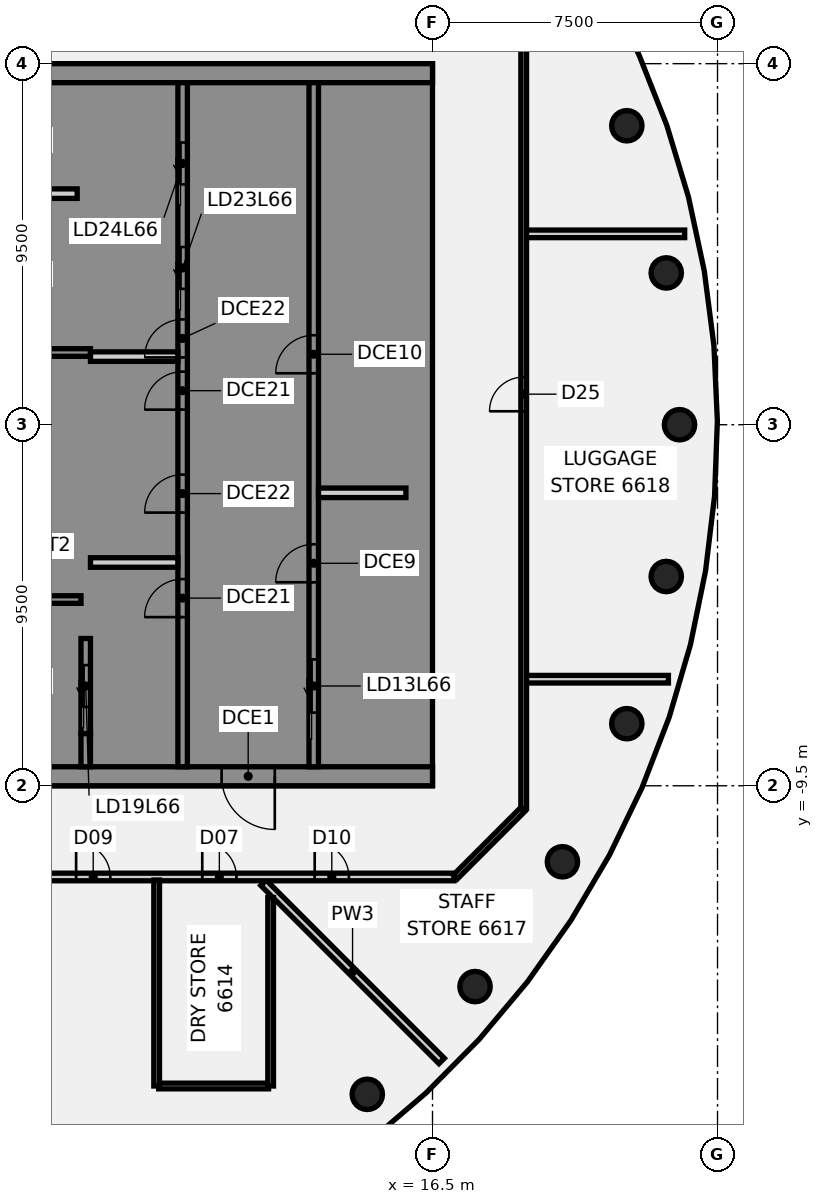
"""IFC4 building model, lengths in metres.
Left out: names, types, materials, properties, quantities, classifications, styles, units other than length and angle.
Written with IfcOpenShell. Run it as: python <this file> out.ifc"""

import sys

from ifc_helpers import new_model, si_unit, direction, frame, frame_2d, origin, origin_2d, place, context, subcontext, project, spatial, polyline, rectangle, circle, outline, extrude, element, fill, save


model = new_model("IFC4")
c1 = context("Model", 3, precision=1e-05, world=origin(), true_north=direction((0.0, 1.0)))
c2 = subcontext(c1, "Body", "Model", "MODEL_VIEW")
j1 = project(units=[si_unit("LENGTHUNIT", "METRE"), si_unit("PLANEANGLEUNIT", "RADIAN")], contexts=[c1])
p1 = place(None, origin())
s1 = spatial("IfcSite", under=j1, at=p1, CompositionType="ELEMENT")
p2 = place(p1, origin())
s2 = spatial("IfcBuilding", under=s1, at=p2, CompositionType="ELEMENT")
p3 = place(p2, frame((0.0, 0.0, 260.4)))
s3 = spatial("IfcBuildingStorey", under=s2, at=p3, CompositionType="ELEMENT", Elevation=260.4)
for number, where, z_axis, x_axis in (
    (1, (23.0, 0.0, -0.14), (0.0, 0.0, 1.0), (1.0, 0.0, 0.0)),
    (2, (22.651, 3.994, -0.14), (0.0, 0.0, 1.0), (1.0, 0.0, 0.0)),
    (3, (21.613, 7.866, -0.14), (0.0, 0.0, 1.0), (1.0, 0.0, 0.0)),
    (4, (14.784, -17.619, -0.14), (0.0, 0.0, 1.0), (1.0, 0.0, 0.0)),
    (5, (17.619, -14.784, -0.14), (0.0, 0.0, 1.0), (1.0, 0.0, 0.0)),
    (6, (19.919, -11.5, -0.14), (0.0, 0.0, 1.0), (1.0, 0.0, 0.0)),
    (7, (21.613, -7.866, -0.14), (0.0, 0.0, 1.0), (1.0, 0.0, 0.0)),
    (8, (22.651, -3.994, -0.14), (0.0, 0.0, 1.0), (1.0, 0.0, 0.0)),
):
    element("IfcColumn", number, at=place(p3, frame(where, z_axis=z_axis, x_axis=x_axis)), inside=s3, PredefinedType="COLUMN", context=c2, shape_type="SweptSolid", body=[
        extrude(circle(Radius=0.4, at=origin_2d()), origin(), (0.0, 0.0, 1.0), 3.6),
    ])
p4 = place(p3, frame((12.052, -12.052, 0.0), z_axis=(0.0, 0.0, 1.0), x_axis=(0.707106781187, -0.707106781187, 0.0)))
e9 = element("IfcWall", 9, at=p4, inside=s3, PredefinedType="PARTITIONING", context=c2, shape_type="SweptSolid", body=[
    extrude(rectangle(XDim=6.631, YDim=0.2, at=frame_2d((3.315, 0.0))), origin(), (0.0, 0.0, 1.0), 2.864),
])
p5 = place(p3, frame((-17.1, -11.9, 0.0), z_axis=(0.0, 0.0, 1.0), x_axis=(1.0, 0.0, 0.0)))
e10 = element("IfcWall", 10, at=p5, inside=s3, PredefinedType="PARTITIONING", context=c2, shape_type="SweptSolid", body=[
    extrude(rectangle(XDim=34.165, YDim=0.2, at=frame_2d((17.083, 0.0))), origin(), (0.0, 0.0, 1.0), 2.864),
])
p6 = place(p5, frame((7.75, 0.0, 0.0)))
e11 = element("IfcOpeningElement", 11, at=p6, cuts=e10, PredefinedType="OPENING", context=c2, shape_type="SweptSolid", body=[
    extrude(rectangle(XDim=0.9, YDim=2.1, at=frame_2d((0.45, 1.05))), frame((0.0, 0.11, 0.0), z_axis=(0.0, -1.0, 0.0), x_axis=(1.0, 0.0, 0.0)), (0.0, 0.0, 1.0), 0.22),
])
p7 = place(p5, frame((27.541, 0.0, 0.0)))
e12 = element("IfcOpeningElement", 12, at=p7, cuts=e10, PredefinedType="OPENING", context=c2, shape_type="SweptSolid", body=[
    extrude(rectangle(XDim=0.9, YDim=2.1, at=frame_2d((0.45, 1.05))), frame((0.0, 0.11, 0.0), z_axis=(0.0, -1.0, 0.0), x_axis=(1.0, 0.0, 0.0)), (0.0, 0.0, 1.0), 0.22),
])
p8 = place(p5, frame((16.809, 0.0, 0.0)))
e13 = element("IfcOpeningElement", 13, at=p8, cuts=e10, PredefinedType="OPENING", context=c2, shape_type="SweptSolid", body=[
    extrude(rectangle(XDim=1.8, YDim=2.1, at=frame_2d((0.9, 1.05))), frame((0.0, 0.11, 0.0), z_axis=(0.0, -1.0, 0.0), x_axis=(1.0, 0.0, 0.0)), (0.0, 0.0, 1.0), 0.22),
])
p9 = place(p5, frame((24.222, 0.0, 0.0)))
e14 = element("IfcOpeningElement", 14, at=p9, cuts=e10, PredefinedType="OPENING", context=c2, shape_type="SweptSolid", body=[
    extrude(rectangle(XDim=0.9, YDim=2.1, at=frame_2d((0.45, 1.05))), frame((0.0, 0.11, 0.0), z_axis=(0.0, -1.0, 0.0), x_axis=(1.0, 0.0, 0.0)), (0.0, 0.0, 1.0), 0.22),
])
p10 = place(p5, frame((30.5, 0.0, 0.0)))
e15 = element("IfcOpeningElement", 15, at=p10, cuts=e10, PredefinedType="OPENING", context=c2, shape_type="SweptSolid", body=[
    extrude(rectangle(XDim=0.9, YDim=2.1, at=frame_2d((0.45, 1.05))), frame((0.0, 0.11, 0.0), z_axis=(0.0, -1.0, 0.0), x_axis=(1.0, 0.0, 0.0)), (0.0, 0.0, 1.0), 0.22),
])
p11 = place(p3, frame((9.296, -17.4, 0.0), z_axis=(0.0, 0.0, 1.0), x_axis=(1.0, 0.0, 0.0)))
e16 = element("IfcWall", 16, at=p11, inside=s3, PredefinedType="PARTITIONING", context=c2, shape_type="SweptSolid", body=[
    extrude(rectangle(XDim=2.89, YDim=0.15, at=frame_2d((1.445, 0.0))), origin(), (0.0, 0.0, 1.0), 2.864),
])
p12 = place(p3, frame((18.955, -6.696, 0.0), z_axis=(0.0, 0.0, 1.0), x_axis=(1.0, 0.0, 0.0)))
e17 = element("IfcWall", 17, at=p12, inside=s3, PredefinedType="PARTITIONING", context=c2, shape_type="SweptSolid", body=[
    extrude(rectangle(XDim=3.753, YDim=0.2, at=frame_2d((1.876, 0.0))), origin(), (0.0, 0.0, 1.0), 2.864),
])
p13 = place(p3, frame((18.955, 5.022, 0.0), z_axis=(0.0, 0.0, 1.0), x_axis=(1.0, 0.0, 0.0)))
e18 = element("IfcWall", 18, at=p13, inside=s3, PredefinedType="PARTITIONING", context=c2, shape_type="SweptSolid", body=[
    extrude(rectangle(XDim=4.181, YDim=0.2, at=frame_2d((2.09, 0.0))), origin(), (0.0, 0.0, 1.0), 2.864),
])
p14 = place(p3, frame((17.1, -11.9, 0.0), z_axis=(0.0, 0.0, 1.0), x_axis=(0.707106781187, 0.707106781187, 0.0)))
e19 = element("IfcWall", 19, at=p14, inside=s3, PredefinedType="PARTITIONING", context=c2, shape_type="SweptSolid", body=[
    extrude(rectangle(XDim=2.505, YDim=0.15, at=frame_2d((1.253, 0.0))), origin(), (0.0, 0.0, 1.0), 2.864),
])
p15 = place(p3, frame((9.241, -17.4, 0.0), z_axis=(0.0, 0.0, 1.0), x_axis=(0.0, 1.0, 0.0)))
e20 = element("IfcWall", 20, at=p15, inside=s3, PredefinedType="PARTITIONING", context=c2, shape_type="SweptSolid", body=[
    extrude(rectangle(XDim=5.42, YDim=0.15, at=frame_2d((2.71, 0.0))), origin(), (0.0, 0.0, 1.0), 2.864),
])
p16 = place(p3, frame((12.241, -17.4, 0.0), z_axis=(0.0, 0.0, 1.0), x_axis=(0.0, 1.0, 0.0)))
e21 = element("IfcWall", 21, at=p16, inside=s3, PredefinedType="PARTITIONING", context=c2, shape_type="SweptSolid", body=[
    extrude(rectangle(XDim=4.959, YDim=0.15, at=frame_2d((2.479, 0.0))), origin(), (0.0, 0.0, 1.0), 2.864),
])
p17 = place(p3, frame((18.9, -10.1, 0.0), z_axis=(0.0, 0.0, 1.0), x_axis=(0.0, 1.0, 0.0)))
e22 = element("IfcWall", 22, at=p17, inside=s3, PredefinedType="PARTITIONING", context=c2, shape_type="SweptSolid", body=[
    extrude(rectangle(XDim=20.2, YDim=0.15, at=frame_2d((10.1, 0.0))), origin(), (0.0, 0.0, 1.0), 2.864),
])
p18 = place(p17, frame((10.454, 0.0, 0.0)))
e23 = element("IfcOpeningElement", 23, at=p18, cuts=e22, PredefinedType="OPENING", context=c2, shape_type="SweptSolid", body=[
    extrude(rectangle(XDim=0.9, YDim=2.1, at=frame_2d((0.45, 1.05))), frame((0.0, 0.085, 0.0), z_axis=(0.0, -1.0, 0.0), x_axis=(1.0, 0.0, 0.0)), (0.0, 0.0, 1.0), 0.17),
])
p19 = place(p3, frame((16.5, -9.25, 0.0), z_axis=(0.0, 0.0, 1.0), x_axis=(-1.0, 0.0, 0.0)))
e24 = element("IfcWall", 24, at=p19, inside=s3, PredefinedType="SHEAR", context=c2, shape_type="SweptSolid", body=[
    extrude(rectangle(XDim=13.0, YDim=0.5, at=frame_2d((6.5, 0.0))), origin(), (0.0, 0.0, 1.0), 3.46),
])
p20 = place(p19, frame((4.15, 0.0, 0.0)))
e25 = element("IfcOpeningElement", 25, at=p20, cuts=e24, PredefinedType="OPENING", context=c2, shape_type="SweptSolid", body=[
    extrude(rectangle(XDim=1.4, YDim=2.1, at=frame_2d((0.7, 1.05))), frame((0.0, 0.26, 0.0), z_axis=(0.0, -1.0, 0.0), x_axis=(1.0, 0.0, 0.0)), (0.0, 0.0, 1.0), 0.52),
])
p21 = place(p19, frame((10.125, 0.0, 0.0)))
e26 = element("IfcOpeningElement", 26, at=p21, cuts=e24, PredefinedType="OPENING", context=c2, shape_type="SweptSolid", body=[
    extrude(rectangle(XDim=1.4, YDim=2.1, at=frame_2d((0.7, 1.05))), frame((0.0, 0.26, 0.0), z_axis=(0.0, -1.0, 0.0), x_axis=(1.0, 0.0, 0.0)), (0.0, 0.0, 1.0), 0.52),
])
p22 = place(p3, origin())
e27 = element("IfcWall", 27, at=p22, inside=s3, PredefinedType="SHEAR", context=c2, shape_type="SweptSolid", body=[
    extrude(outline(polyline([(13.5, -8.125), (13.5, -9.0), (16.0, -9.0), (16.5, -9.0), (16.5, 9.0), (16.0, 9.0), (13.5, 9.0), (13.5, 8.125), (16.0, 8.125), (16.0, 5.625), (13.5, 5.625), (13.5, 5.375), (16.0, 5.375), (16.0, -5.375), (13.5, -5.375), (13.5, -5.625), (16.0, -5.625), (16.0, -8.125), (13.5, -8.125)])), origin(), (0.0, 0.0, 1.0), 3.46),
])
p23 = place(p3, frame((16.5, 9.25, 0.0), z_axis=(0.0, 0.0, 1.0), x_axis=(-1.0, 0.0, 0.0)))
e28 = element("IfcWall", 28, at=p23, inside=s3, PredefinedType="SHEAR", context=c2, shape_type="SweptSolid", body=[
    extrude(rectangle(XDim=13.0, YDim=0.5, at=frame_2d((6.5, 0.0))), origin(), (0.0, 0.0, 1.0), 3.46),
])
p24 = place(p3, origin())
e29 = element("IfcWall", 29, at=p24, inside=s3, PredefinedType="SHEAR", context=c2, shape_type="SweptSolid", body=[
    extrude(outline(polyline([(9.8, -5.375), (7.5, -5.375), (7.5, 2.625), (9.8, 2.625), (9.8, 2.875), (7.5, 2.875), (7.5, 5.375), (9.8, 5.375), (9.8, 5.625), (7.5, 5.625), (7.5, 8.125), (9.8, 8.125), (9.8, 9.0), (7.5, 9.0), (7.25, 9.0), (7.25, -5.625), (7.5, -5.625), (9.8, -5.625), (9.8, -5.375)])), origin(), (0.0, 0.0, 1.0), 3.46),
])
p25 = place(p3, origin())
e30 = element("IfcWall", 30, at=p25, inside=s3, PredefinedType="SHEAR", context=c2, shape_type="SweptSolid", body=[
    extrude(outline(polyline([(7.5, -8.125), (7.5, -9.0), (9.8, -9.0), (9.8, -8.125), (9.8, -5.625), (9.55, -5.625), (9.55, -8.125), (7.5, -8.125)])), origin(), (0.0, 0.0, 1.0), 3.46),
])
p26 = place(p3, frame((7.375, -9.0, 0.0), z_axis=(0.0, 0.0, 1.0), x_axis=(0.0, 1.0, 0.0)))
e31 = element("IfcWall", 31, at=p26, inside=s3, PredefinedType="SHEAR", context=c2, shape_type="SweptSolid", body=[
    extrude(rectangle(XDim=0.875, YDim=0.25, at=frame_2d((0.438, 0.0))), origin(), (0.0, 0.0, 1.0), 3.46),
])
p27 = place(p3, frame((7.5, 1.9, 0.0), z_axis=(0.0, 0.0, 1.0), x_axis=(-1.0, 0.0, 0.0)))
e32 = element("IfcWall", 32, at=p27, inside=s3, PredefinedType="SHEAR", context=c2, shape_type="SweptSolid", body=[
    extrude(rectangle(XDim=3.3, YDim=0.2, at=frame_2d((1.65, 0.0))), origin(), (0.0, 0.0, 1.0), 3.46),
])
p28 = place(p3, frame((13.375, -9.0, 0.0), z_axis=(0.0, 0.0, 1.0), x_axis=(0.0, 1.0, 0.0)))
e33 = element("IfcWall", 33, at=p28, inside=s3, PredefinedType="SHEAR", context=c2, shape_type="SweptSolid", body=[
    extrude(rectangle(XDim=18.0, YDim=0.25, at=frame_2d((9.0, 0.0))), origin(), (0.0, 0.0, 1.0), 3.46),
])
p29 = place(p28, frame((1.425, 0.0, 0.0)))
e34 = element("IfcOpeningElement", 34, at=p29, cuts=e33, PredefinedType="OPENING", context=c2, shape_type="SweptSolid", body=[
    extrude(rectangle(XDim=1.4, YDim=2.1, at=frame_2d((0.7, 1.05))), frame((0.0, 0.135, 0.0), z_axis=(0.0, -1.0, 0.0), x_axis=(1.0, 0.0, 0.0)), (0.0, 0.0, 1.0), 0.27),
])
p30 = place(p28, frame((4.854, 0.0, 0.0)))
e35 = element("IfcOpeningElement", 35, at=p30, cuts=e33, PredefinedType="OPENING", context=c2, shape_type="SweptSolid", body=[
    extrude(rectangle(XDim=1.0, YDim=2.1, at=frame_2d((0.5, 1.05))), frame((0.0, 0.135, 0.0), z_axis=(0.0, -1.0, 0.0), x_axis=(1.0, 0.0, 0.0)), (0.0, 0.0, 1.0), 0.27),
])
p31 = place(p28, frame((10.354, 0.0, 0.0)))
e36 = element("IfcOpeningElement", 36, at=p31, cuts=e33, PredefinedType="OPENING", context=c2, shape_type="SweptSolid", body=[
    extrude(rectangle(XDim=1.0, YDim=2.1, at=frame_2d((0.5, 1.05))), frame((0.0, 0.135, 0.0), z_axis=(0.0, -1.0, 0.0), x_axis=(1.0, 0.0, 0.0)), (0.0, 0.0, 1.0), 0.27),
])
p32 = place(p3, frame((9.925, -9.0, 0.0), z_axis=(0.0, 0.0, 1.0), x_axis=(0.0, 1.0, 0.0)))
e37 = element("IfcWall", 37, at=p32, inside=s3, PredefinedType="SHEAR", context=c2, shape_type="SweptSolid", body=[
    extrude(rectangle(XDim=18.0, YDim=0.25, at=frame_2d((9.0, 0.0))), origin(), (0.0, 0.0, 1.0), 3.46),
])
p33 = place(p32, frame((12.575, 0.0, 0.0)))
e38 = element("IfcOpeningElement", 38, at=p33, cuts=e37, PredefinedType="OPENING", context=c2, shape_type="SweptSolid", body=[
    extrude(rectangle(XDim=1.1, YDim=2.1, at=frame_2d((0.55, 1.05))), frame((0.0, 0.135, 0.0), z_axis=(0.0, -1.0, 0.0), x_axis=(1.0, 0.0, 0.0)), (0.0, 0.0, 1.0), 0.27),
])
p34 = place(p32, frame((15.325, 0.0, 0.0)))
e39 = element("IfcOpeningElement", 39, at=p34, cuts=e37, PredefinedType="OPENING", context=c2, shape_type="SweptSolid", body=[
    extrude(rectangle(XDim=1.1, YDim=2.1, at=frame_2d((0.55, 1.05))), frame((0.0, 0.135, 0.0), z_axis=(0.0, -1.0, 0.0), x_axis=(1.0, 0.0, 0.0)), (0.0, 0.0, 1.0), 0.27),
])
p35 = place(p32, frame((3.938, 0.0, 0.0)))
e40 = element("IfcOpeningElement", 40, at=p35, cuts=e37, PredefinedType="OPENING", context=c2, shape_type="SweptSolid", body=[
    extrude(rectangle(XDim=1.0, YDim=2.1, at=frame_2d((0.5, 1.05))), frame((0.0, 0.135, 0.0), z_axis=(0.0, -1.0, 0.0), x_axis=(1.0, 0.0, 0.0)), (0.0, 0.0, 1.0), 0.27),
])
p36 = place(p32, frame((6.688, 0.0, 0.0)))
e41 = element("IfcOpeningElement", 41, at=p36, cuts=e37, PredefinedType="OPENING", context=c2, shape_type="SweptSolid", body=[
    extrude(rectangle(XDim=1.0, YDim=2.1, at=frame_2d((0.5, 1.05))), frame((0.0, 0.135, 0.0), z_axis=(0.0, -1.0, 0.0), x_axis=(1.0, 0.0, 0.0)), (0.0, 0.0, 1.0), 0.27),
])
p37 = place(p32, frame((9.396, 0.0, 0.0)))
e42 = element("IfcOpeningElement", 42, at=p37, cuts=e37, PredefinedType="OPENING", context=c2, shape_type="SweptSolid", body=[
    extrude(rectangle(XDim=1.0, YDim=2.1, at=frame_2d((0.5, 1.05))), frame((0.0, 0.135, 0.0), z_axis=(0.0, -1.0, 0.0), x_axis=(1.0, 0.0, 0.0)), (0.0, 0.0, 1.0), 0.27),
])
p38 = place(p32, frame((10.771, 0.0, 0.0)))
e43 = element("IfcOpeningElement", 43, at=p38, cuts=e37, PredefinedType="OPENING", context=c2, shape_type="SweptSolid", body=[
    extrude(rectangle(XDim=1.0, YDim=2.1, at=frame_2d((0.5, 1.05))), frame((0.0, 0.135, 0.0), z_axis=(0.0, -1.0, 0.0), x_axis=(1.0, 0.0, 0.0)), (0.0, 0.0, 1.0), 0.27),
])
p39 = place(p3, frame((7.375, -8.125, 0.0), z_axis=(0.0, 0.0, 1.0), x_axis=(0.0, 1.0, 0.0)))
e44 = element("IfcWall", 44, at=p39, inside=s3, PredefinedType="SHEAR", context=c2, shape_type="SweptSolid", body=[
    extrude(rectangle(XDim=2.5, YDim=0.25, at=frame_2d((1.25, 0.0))), origin(), (0.0, 0.0, 1.0), 3.46),
])
p40 = place(p39, frame((0.7, 0.0, 0.0)))
e45 = element("IfcOpeningElement", 45, at=p40, cuts=e44, PredefinedType="OPENING", context=c2, shape_type="SweptSolid", body=[
    extrude(rectangle(XDim=1.1, YDim=2.1, at=frame_2d((0.55, 1.05))), frame((0.0, 0.135, 0.0), z_axis=(0.0, -1.0, 0.0), x_axis=(1.0, 0.0, 0.0)), (0.0, 0.0, 1.0), 0.27),
])
p41 = place(p3, frame((7.15, 6.08, 0.0), z_axis=(0.0, 0.0, 1.0), x_axis=(-1.0, 0.0, 0.0)))
e46 = element("IfcWall", 46, at=p41, inside=s3, PredefinedType="PARTITIONING", context=c2, shape_type="SweptSolid", body=[
    extrude(rectangle(XDim=2.95, YDim=0.25, at=frame_2d((1.475, 0.0))), origin(), (0.0, 0.0, 1.0), 3.46),
])
p42 = place(p3, frame((7.25, -4.6, 0.0), z_axis=(0.0, 0.0, 1.0), x_axis=(-1.0, 0.0, 0.0)))
e47 = element("IfcWall", 47, at=p42, inside=s3, PredefinedType="SHEAR", context=c2, shape_type="SweptSolid", body=[
    extrude(rectangle(XDim=3.25, YDim=0.2, at=frame_2d((1.625, 0.0))), origin(), (0.0, 0.0, 1.0), 3.46),
])
p43 = place(p42, frame((1.025, 0.0, 0.0)))
e48 = element("IfcOpeningElement", 48, at=p43, cuts=e47, PredefinedType="OPENING", context=c2, shape_type="SweptSolid", body=[
    extrude(rectangle(XDim=1.1, YDim=2.1, at=frame_2d((0.55, 1.05))), frame((0.0, 0.11, 0.0), z_axis=(0.0, -1.0, 0.0), x_axis=(1.0, 0.0, 0.0)), (0.0, 0.0, 1.0), 0.22),
])
for number, where, z_axis, x_axis in (
    (49, (15.8, -1.792, 0.0), (0.0, 0.0, 1.0), (-1.0, 0.0, 0.0)),
    (50, (9.8, -3.625, 0.0), (0.0, 0.0, 1.0), (-1.0, 0.0, 0.0)),
    (51, (9.8, 1.792, 0.0), (0.0, 0.0, 1.0), (-1.0, 0.0, 0.0)),
):
    element("IfcWall", number, at=place(p3, frame(where, z_axis=z_axis, x_axis=x_axis)), inside=s3, PredefinedType="PARTITIONING", context=c2, shape_type="SweptSolid", body=[
        extrude(rectangle(XDim=2.3, YDim=0.25, at=frame_2d((1.15, 0.0))), origin(), (0.0, 0.0, 1.0), 3.46),
    ])
p44 = place(p7, frame((0.9, 0.0, 0.0), z_axis=(0.0, 0.0, 1.0), x_axis=(-1.0, 0.0, 0.0)))
e52 = element("IfcDoor", 52, at=p44, inside=s3, OperationType="SINGLE_SWING_RIGHT", PredefinedType="DOOR", context=c2, shape_type="SweptSolid", body=[
    extrude(rectangle(XDim=0.9, YDim=2.1, at=frame_2d((0.45, 1.05))), frame((0.0, 0.025, 0.0), z_axis=(0.0, -1.0, 0.0), x_axis=(1.0, 0.0, 0.0)), (0.0, 0.0, 1.0), 0.05),
])
fill(e12, e52)
p45 = place(p9, frame((0.9, 0.0, 0.0), z_axis=(0.0, 0.0, 1.0), x_axis=(-1.0, 0.0, 0.0)))
e53 = element("IfcDoor", 53, at=p45, inside=s3, OperationType="SINGLE_SWING_RIGHT", PredefinedType="DOOR", context=c2, shape_type="SweptSolid", body=[
    extrude(rectangle(XDim=0.9, YDim=2.1, at=frame_2d((0.45, 1.05))), frame((0.0, 0.025, 0.0), z_axis=(0.0, -1.0, 0.0), x_axis=(1.0, 0.0, 0.0)), (0.0, 0.0, 1.0), 0.05),
])
fill(e14, e53)
p46 = place(p10, frame((0.9, 0.0, 0.0), z_axis=(0.0, 0.0, 1.0), x_axis=(-1.0, 0.0, 0.0)))
e54 = element("IfcDoor", 54, at=p46, inside=s3, OperationType="SINGLE_SWING_RIGHT", PredefinedType="DOOR", context=c2, shape_type="SweptSolid", body=[
    extrude(rectangle(XDim=0.9, YDim=2.1, at=frame_2d((0.45, 1.05))), frame((0.0, 0.025, 0.0), z_axis=(0.0, -1.0, 0.0), x_axis=(1.0, 0.0, 0.0)), (0.0, 0.0, 1.0), 0.05),
])
fill(e15, e54)
p47 = place(p18, frame((0.9, 0.0, 0.0), z_axis=(0.0, 0.0, 1.0), x_axis=(-1.0, 0.0, 0.0)))
e55 = element("IfcDoor", 55, at=p47, inside=s3, OperationType="SINGLE_SWING_RIGHT", PredefinedType="DOOR", context=c2, shape_type="SweptSolid", body=[
    extrude(rectangle(XDim=0.9, YDim=2.1, at=frame_2d((0.45, 1.05))), frame((0.0, 0.025, 0.0), z_axis=(0.0, -1.0, 0.0), x_axis=(1.0, 0.0, 0.0)), (0.0, 0.0, 1.0), 0.05),
])
fill(e23, e55)
p48 = place(p20, origin())
e56 = element("IfcDoor", 56, at=p48, inside=s3, OperationType="SINGLE_SWING_LEFT", PredefinedType="DOOR", context=c2, shape_type="SweptSolid", body=[
    extrude(rectangle(XDim=1.4, YDim=2.1, at=frame_2d((0.7, 1.05))), frame((0.0, 0.025, 0.0), z_axis=(0.0, -1.0, 0.0), x_axis=(1.0, 0.0, 0.0)), (0.0, 0.0, 1.0), 0.05),
])
fill(e25, e56)
p49 = place(p29, origin())
e57 = element("IfcDoor", 57, at=p49, inside=s3, OperationType="SLIDING_TO_LEFT", PredefinedType="DOOR", context=c2, shape_type="SweptSolid", body=[
    extrude(rectangle(XDim=1.4, YDim=2.1, at=frame_2d((0.7, 1.05))), frame((0.0, 0.025, 0.0), z_axis=(0.0, -1.0, 0.0), x_axis=(1.0, 0.0, 0.0)), (0.0, 0.0, 1.0), 0.05),
])
fill(e34, e57)
p50 = place(p40, origin())
e58 = element("IfcDoor", 58, at=p50, inside=s3, OperationType="SLIDING_TO_LEFT", PredefinedType="DOOR", context=c2, shape_type="SweptSolid", body=[
    extrude(rectangle(XDim=1.1, YDim=2.1, at=frame_2d((0.55, 1.05))), frame((0.0, 0.025, 0.0), z_axis=(0.0, -1.0, 0.0), x_axis=(1.0, 0.0, 0.0)), (0.0, 0.0, 1.0), 0.05),
])
fill(e45, e58)
p51 = place(p33, origin())
e59 = element("IfcDoor", 59, at=p51, inside=s3, OperationType="SLIDING_TO_LEFT", PredefinedType="DOOR", context=c2, shape_type="SweptSolid", body=[
    extrude(rectangle(XDim=1.1, YDim=2.1, at=frame_2d((0.55, 1.05))), frame((0.0, 0.025, 0.0), z_axis=(0.0, -1.0, 0.0), x_axis=(1.0, 0.0, 0.0)), (0.0, 0.0, 1.0), 0.05),
])
fill(e38, e59)
p52 = place(p34, origin())
e60 = element("IfcDoor", 60, at=p52, inside=s3, OperationType="SLIDING_TO_LEFT", PredefinedType="DOOR", context=c2, shape_type="SweptSolid", body=[
    extrude(rectangle(XDim=1.1, YDim=2.1, at=frame_2d((0.55, 1.05))), frame((0.0, 0.025, 0.0), z_axis=(0.0, -1.0, 0.0), x_axis=(1.0, 0.0, 0.0)), (0.0, 0.0, 1.0), 0.05),
])
fill(e39, e60)
p53 = place(p30, origin())
e61 = element("IfcDoor", 61, at=p53, inside=s3, OperationType="SINGLE_SWING_LEFT", PredefinedType="DOOR", context=c2, shape_type="SweptSolid", body=[
    extrude(rectangle(XDim=1.0, YDim=2.1, at=frame_2d((0.5, 1.05))), frame((0.0, 0.025, 0.0), z_axis=(0.0, -1.0, 0.0), x_axis=(1.0, 0.0, 0.0)), (0.0, 0.0, 1.0), 0.05),
])
fill(e35, e61)
p54 = place(p31, origin())
e62 = element("IfcDoor", 62, at=p54, inside=s3, OperationType="SINGLE_SWING_LEFT", PredefinedType="DOOR", context=c2, shape_type="SweptSolid", body=[
    extrude(rectangle(XDim=1.0, YDim=2.1, at=frame_2d((0.5, 1.05))), frame((0.0, 0.025, 0.0), z_axis=(0.0, -1.0, 0.0), x_axis=(1.0, 0.0, 0.0)), (0.0, 0.0, 1.0), 0.05),
])
fill(e36, e62)
p55 = place(p35, origin())
e63 = element("IfcDoor", 63, at=p55, inside=s3, OperationType="SINGLE_SWING_LEFT", PredefinedType="DOOR", context=c2, shape_type="SweptSolid", body=[
    extrude(rectangle(XDim=1.0, YDim=2.1, at=frame_2d((0.5, 1.05))), frame((0.0, 0.025, 0.0), z_axis=(0.0, -1.0, 0.0), x_axis=(1.0, 0.0, 0.0)), (0.0, 0.0, 1.0), 0.05),
])
fill(e40, e63)
p56 = place(p36, origin())
e64 = element("IfcDoor", 64, at=p56, inside=s3, OperationType="SINGLE_SWING_LEFT", PredefinedType="DOOR", context=c2, shape_type="SweptSolid", body=[
    extrude(rectangle(XDim=1.0, YDim=2.1, at=frame_2d((0.5, 1.05))), frame((0.0, 0.025, 0.0), z_axis=(0.0, -1.0, 0.0), x_axis=(1.0, 0.0, 0.0)), (0.0, 0.0, 1.0), 0.05),
])
fill(e41, e64)
p57 = place(p37, origin())
e65 = element("IfcDoor", 65, at=p57, inside=s3, OperationType="SINGLE_SWING_LEFT", PredefinedType="DOOR", context=c2, shape_type="SweptSolid", body=[
    extrude(rectangle(XDim=1.0, YDim=2.1, at=frame_2d((0.5, 1.05))), frame((0.0, 0.025, 0.0), z_axis=(0.0, -1.0, 0.0), x_axis=(1.0, 0.0, 0.0)), (0.0, 0.0, 1.0), 0.05),
])
fill(e42, e65)
p58 = place(p38, origin())
e66 = element("IfcDoor", 66, at=p58, inside=s3, OperationType="SINGLE_SWING_LEFT", PredefinedType="DOOR", context=c2, shape_type="SweptSolid", body=[
    extrude(rectangle(XDim=1.0, YDim=2.1, at=frame_2d((0.5, 1.05))), frame((0.0, 0.025, 0.0), z_axis=(0.0, -1.0, 0.0), x_axis=(1.0, 0.0, 0.0)), (0.0, 0.0, 1.0), 0.05),
])
fill(e43, e66)
save(model, sys.argv[1])
